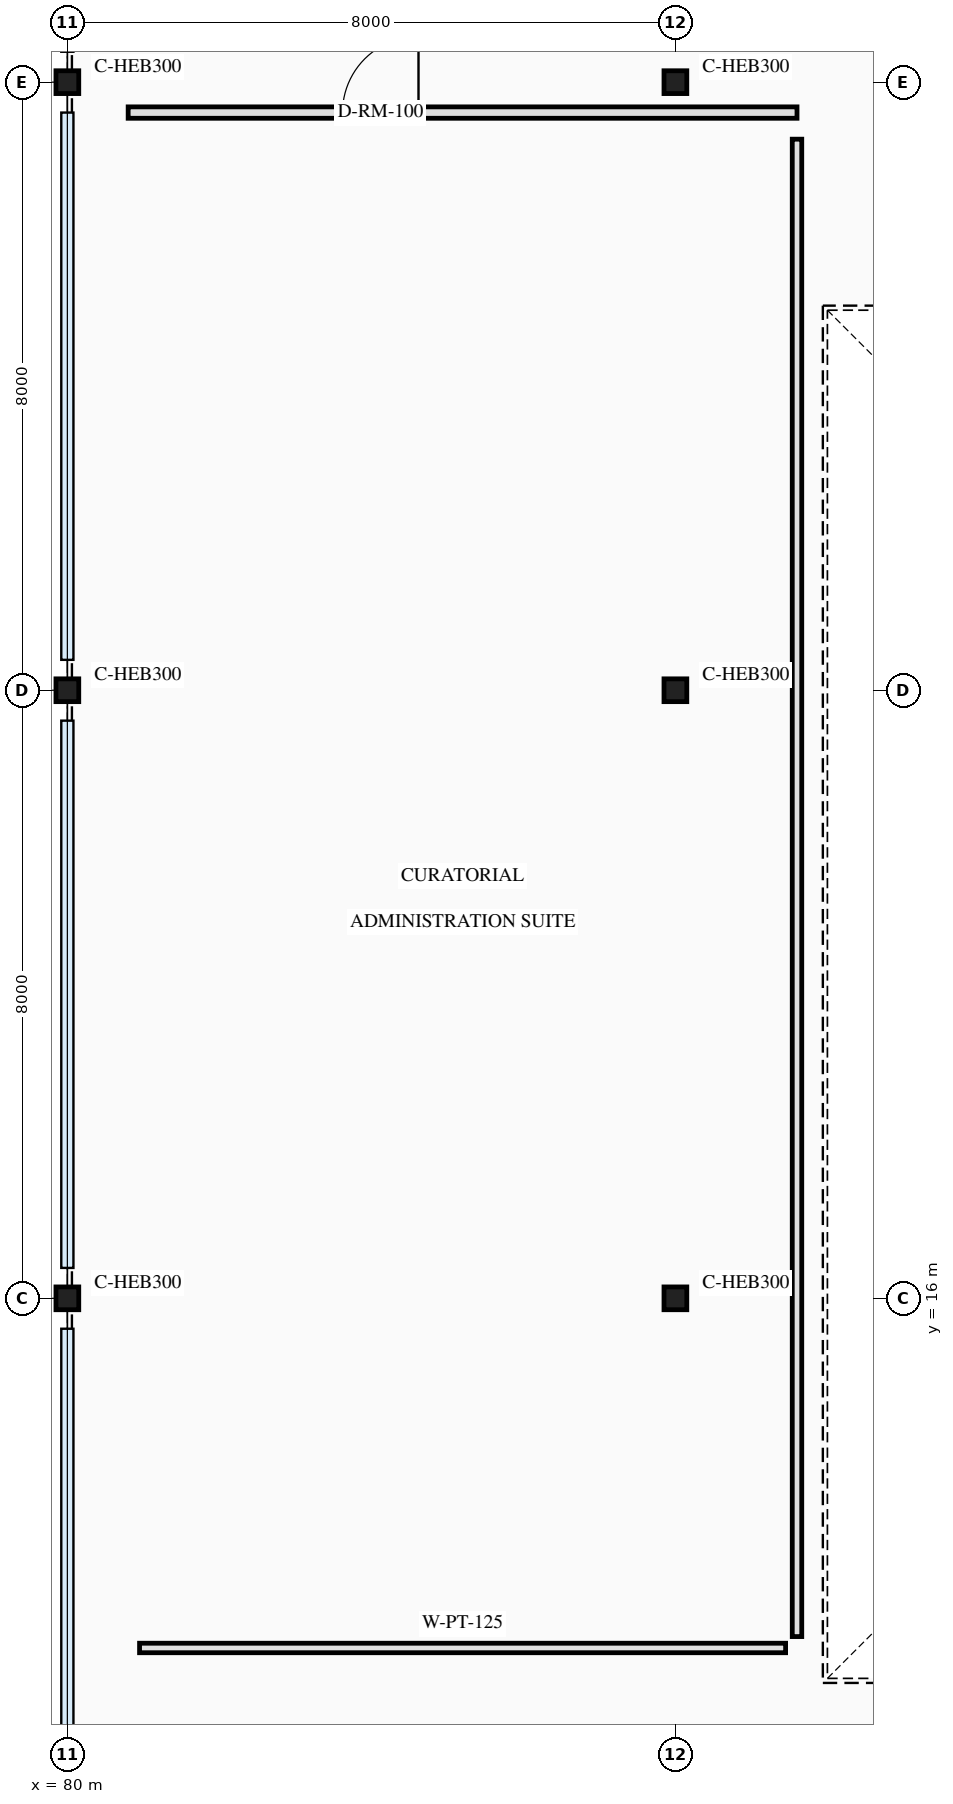
"""IFC4 building model, lengths in metres.
Left out: names, types, materials, properties, quantities, classifications, styles, units other than length and angle.
Written with IfcOpenShell. Run it as: python <this file> out.ifc"""

import sys

from ifc_helpers import new_model, si_unit, direction, frame, frame_2d, origin, origin_2d, place, context, subcontext, project, spatial, rectangle, i_section, extrude, element, fill, save


model = new_model("IFC4")
c1 = context("Model", 3, precision=1e-05, world=origin(), true_north=direction((0.0, 1.0)))
c2 = subcontext(c1, "Body", "Model", "MODEL_VIEW")
j1 = project(units=[si_unit("LENGTHUNIT", "METRE"), si_unit("PLANEANGLEUNIT", "RADIAN")], contexts=[c1])
p1 = place(None, origin())
s1 = spatial("IfcSite", under=j1, at=p1, CompositionType="ELEMENT")
p2 = place(p1, origin())
s2 = spatial("IfcBuilding", under=s1, at=p2, CompositionType="ELEMENT")
p3 = place(p2, frame((0.0, 0.0, 21.8)))
s3 = spatial("IfcBuildingStorey", under=s2, at=p3, CompositionType="ELEMENT", Elevation=21.8)
for number, where, z_axis, x_axis in (
    (1, (80.0, 16.0, 0.0), (0.0, 0.0, 1.0), (1.0, 0.0, 0.0)),
    (2, (80.0, 24.0, 0.0), (0.0, 0.0, 1.0), (1.0, 0.0, 0.0)),
    (3, (80.0, 32.0, 0.0), (0.0, 0.0, 1.0), (1.0, 0.0, 0.0)),
    (4, (88.0, 16.0, 0.0), (0.0, 0.0, 1.0), (1.0, 0.0, 0.0)),
    (5, (88.0, 24.0, 0.0), (0.0, 0.0, 1.0), (1.0, 0.0, 0.0)),
    (6, (88.0, 32.0, 0.0), (0.0, 0.0, 1.0), (1.0, 0.0, 0.0)),
):
    element("IfcColumn", number, at=place(p3, frame(where, z_axis=z_axis, x_axis=x_axis)), inside=s3, PredefinedType="COLUMN", context=c2, shape_type="SweptSolid", body=[
        extrude(i_section(OverallWidth=0.3, OverallDepth=0.3, WebThickness=0.011, FlangeThickness=0.019, FilletRadius=0.027, at=origin_2d()), origin(), (0.0, 0.0, 1.0), 4.2),
    ])
p4 = place(p3, frame((80.8, 31.6, 0.0), z_axis=(0.0, 0.0, 1.0), x_axis=(1.0, 0.0, 0.0)))
e7 = element("IfcWall", 7, at=p4, inside=s3, PredefinedType="PARTITIONING", context=c2, shape_type="SweptSolid", body=[
    extrude(rectangle(XDim=8.8, YDim=0.15, at=frame_2d((4.4, 0.0))), origin(), (0.0, 0.0, 1.0), 3.92),
])
p5 = place(p4, frame((2.82, 0.0, 0.0)))
e8 = element("IfcOpeningElement", 8, at=p5, cuts=e7, PredefinedType="OPENING", context=c2, shape_type="SweptSolid", body=[
    extrude(rectangle(XDim=1.0, YDim=2.15, at=frame_2d((0.5, 1.075))), frame((0.0, 0.085, 0.0), z_axis=(0.0, -1.0, 0.0), x_axis=(1.0, 0.0, 0.0)), (0.0, 0.0, 1.0), 0.17),
])
p6 = place(p3, frame((80.95, 11.4, 0.0), z_axis=(0.0, 0.0, 1.0), x_axis=(1.0, 0.0, 0.0)))
e9 = element("IfcWall", 9, at=p6, inside=s3, PredefinedType="PARTITIONING", context=c2, shape_type="SweptSolid", body=[
    extrude(rectangle(XDim=8.5, YDim=0.125, at=frame_2d((4.25, 0.0))), origin(), (0.0, 0.0, 1.0), 3.92),
])
p7 = place(p3, frame((89.6, 11.55, 0.0), z_axis=(0.0, 0.0, 1.0), x_axis=(0.0, 1.0, 0.0)))
e10 = element("IfcWall", 10, at=p7, inside=s3, PredefinedType="PARTITIONING", context=c2, shape_type="SweptSolid", body=[
    extrude(rectangle(XDim=19.7, YDim=0.125, at=frame_2d((9.85, 0.0))), origin(), (0.0, 0.0, 1.0), 3.92),
])
p8 = place(p5, origin())
e11 = element("IfcDoor", 11, at=p8, inside=s3, OperationType="SINGLE_SWING_RIGHT", PredefinedType="DOOR", context=c2, shape_type="SweptSolid", body=[
    extrude(rectangle(XDim=1.0, YDim=2.15, at=frame_2d((0.5, 1.075))), frame((0.0, 0.025, 0.0), z_axis=(0.0, -1.0, 0.0), x_axis=(1.0, 0.0, 0.0)), (0.0, 0.0, 1.0), 0.05),
])
fill(e8, e11)
save(model, sys.argv[1])
